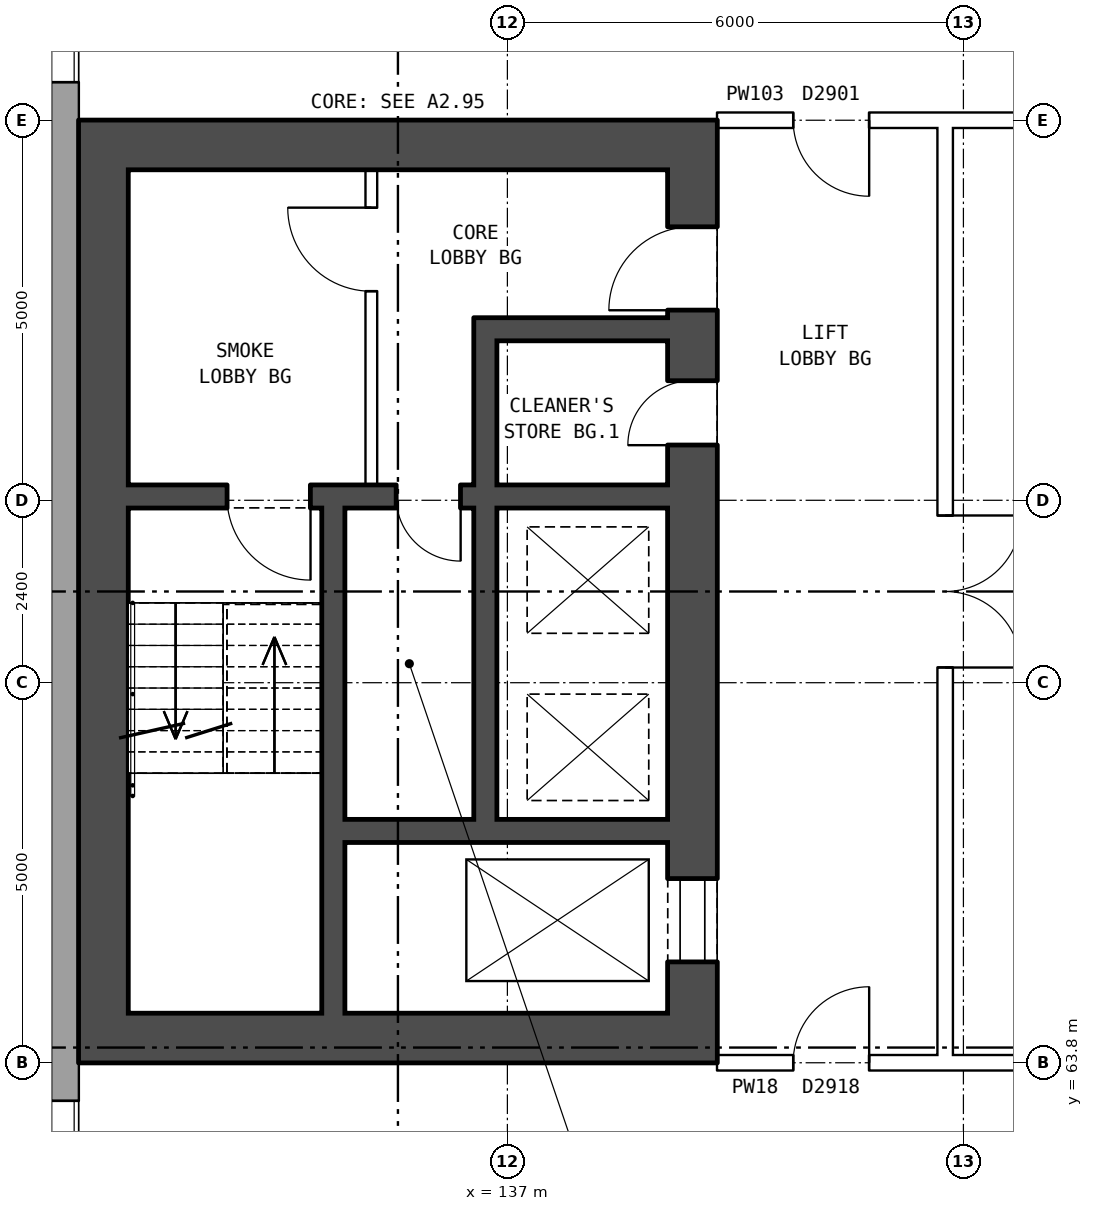
"""IFC4 building model, lengths in metres.
Left out: names, types, materials, properties, quantities, classifications, styles, units other than length and angle.
Written with IfcOpenShell. Run it as: python <this file> out.ifc"""

import sys

from ifc_helpers import new_model, si_unit, direction, frame, frame_2d, origin, place, context, subcontext, project, spatial, rectangle, extrude, element, fill, save


model = new_model("IFC4")
c1 = context("Model", 3, precision=1e-05, world=origin(), true_north=direction((0.0, 1.0)))
c2 = subcontext(c1, "Body", "Model", "MODEL_VIEW")
j1 = project(units=[si_unit("LENGTHUNIT", "METRE"), si_unit("PLANEANGLEUNIT", "RADIAN")], contexts=[c1])
p1 = place(None, origin())
s1 = spatial("IfcSite", under=j1, at=p1, CompositionType="ELEMENT")
p2 = place(p1, origin())
s2 = spatial("IfcBuilding", under=s1, at=p2, CompositionType="ELEMENT")
p3 = place(p2, frame((0.0, 0.0, 90.2)))
s3 = spatial("IfcBuildingStorey", under=s2, at=p3, CompositionType="ELEMENT", Elevation=90.2)
p4 = place(p3, frame((131.18, 82.925, 0.0), z_axis=(0.0, 0.0, 1.0), x_axis=(0.0, -1.0, 0.0)))
e1 = element("IfcWall", 1, at=p4, inside=s3, PredefinedType="STANDARD", context=c2, shape_type="SweptSolid", body=[
    extrude(rectangle(XDim=25.851, YDim=0.36, at=frame_2d((12.925, 0.0))), origin(), (0.0, 0.0, 1.0), 5.6),
])
p5 = place(p4, frame((1.625, 0.0, 0.15)))
e2 = element("IfcOpeningElement", 2, at=p5, cuts=e1, PredefinedType="OPENING", context=c2, shape_type="SweptSolid", body=[
    extrude(rectangle(XDim=1.6, YDim=2.4, at=frame_2d((0.8, 1.2))), frame((0.0, 0.19, 0.0), z_axis=(0.0, -1.0, 0.0), x_axis=(1.0, 0.0, 0.0)), (0.0, 0.0, 1.0), 0.38),
])
p6 = place(p4, frame((4.625, 0.0, 0.15)))
e3 = element("IfcOpeningElement", 3, at=p6, cuts=e1, PredefinedType="OPENING", context=c2, shape_type="SweptSolid", body=[
    extrude(rectangle(XDim=1.6, YDim=2.4, at=frame_2d((0.8, 1.2))), frame((0.0, 0.19, 0.0), z_axis=(0.0, -1.0, 0.0), x_axis=(1.0, 0.0, 0.0)), (0.0, 0.0, 1.0), 0.38),
])
p7 = place(p4, frame((19.625, 0.0, 0.15)))
e4 = element("IfcOpeningElement", 4, at=p7, cuts=e1, PredefinedType="OPENING", context=c2, shape_type="SweptSolid", body=[
    extrude(rectangle(XDim=1.6, YDim=2.4, at=frame_2d((0.8, 1.2))), frame((0.0, 0.19, 0.0), z_axis=(0.0, -1.0, 0.0), x_axis=(1.0, 0.0, 0.0)), (0.0, 0.0, 1.0), 0.38),
])
p8 = place(p4, frame((22.625, 0.0, 0.15)))
e5 = element("IfcOpeningElement", 5, at=p8, cuts=e1, PredefinedType="OPENING", context=c2, shape_type="SweptSolid", body=[
    extrude(rectangle(XDim=1.6, YDim=2.4, at=frame_2d((0.8, 1.2))), frame((0.0, 0.19, 0.0), z_axis=(0.0, -1.0, 0.0), x_axis=(1.0, 0.0, 0.0)), (0.0, 0.0, 1.0), 0.38),
])
p9 = place(p3, frame((139.435, 64.45, 0.0), z_axis=(0.0, 0.0, 1.0), x_axis=(0.0, 1.0, 0.0)))
e6 = element("IfcWall", 6, at=p9, inside=s3, PredefinedType="SHEAR", context=c2, shape_type="SweptSolid", body=[
    extrude(rectangle(XDim=11.1, YDim=0.65, at=frame_2d((5.55, 0.0))), origin(), (0.0, 0.0, 1.0), 5.6),
])
p10 = place(p9, frame((0.675, 0.0, 0.0)))
e7 = element("IfcOpeningElement", 7, at=p10, cuts=e6, PredefinedType="OPENING", context=c2, shape_type="SweptSolid", body=[
    extrude(rectangle(XDim=1.1, YDim=2.1, at=frame_2d((0.55, 1.05))), frame((0.0, 0.335, 0.0), z_axis=(0.0, -1.0, 0.0), x_axis=(1.0, 0.0, 0.0)), (0.0, 0.0, 1.0), 0.67),
])
p11 = place(p9, frame((9.25, 0.0, 0.0)))
e8 = element("IfcOpeningElement", 8, at=p11, cuts=e6, PredefinedType="OPENING", context=c2, shape_type="SweptSolid", body=[
    extrude(rectangle(XDim=1.1, YDim=2.1, at=frame_2d((0.55, 1.05))), frame((0.0, 0.335, 0.0), z_axis=(0.0, -1.0, 0.0), x_axis=(1.0, 0.0, 0.0)), (0.0, 0.0, 1.0), 0.67),
])
p12 = place(p9, frame((7.475, 0.0, 0.0)))
e9 = element("IfcOpeningElement", 9, at=p12, cuts=e6, PredefinedType="OPENING", context=c2, shape_type="SweptSolid", body=[
    extrude(rectangle(XDim=0.85, YDim=2.1, at=frame_2d((0.425, 1.05))), frame((0.0, 0.335, 0.0), z_axis=(0.0, -1.0, 0.0), x_axis=(1.0, 0.0, 0.0)), (0.0, 0.0, 1.0), 0.67),
])
p13 = place(p3, frame((131.685, 64.45, 0.0), z_axis=(0.0, 0.0, 1.0), x_axis=(0.0, 1.0, 0.0)))
e10 = element("IfcWall", 10, at=p13, inside=s3, PredefinedType="SHEAR", context=c2, shape_type="SweptSolid", body=[
    extrude(rectangle(XDim=11.1, YDim=0.65, at=frame_2d((5.55, 0.0))), origin(), (0.0, 0.0, 1.0), 5.6),
])
for number, where, z_axis, x_axis in (
    (11, (139.76, 64.125, 0.0), (0.0, 0.0, 1.0), (-1.0, 0.0, 0.0)),
    (12, (139.76, 75.875, 0.0), (0.0, 0.0, 1.0), (-1.0, 0.0, 0.0)),
):
    element("IfcWall", number, at=place(p3, frame(where, z_axis=z_axis, x_axis=x_axis)), inside=s3, PredefinedType="SHEAR", context=c2, shape_type="SweptSolid", body=[
        extrude(rectangle(XDim=8.4, YDim=0.65, at=frame_2d((4.2, 0.0))), origin(), (0.0, 0.0, 1.0), 5.6),
    ])
p14 = place(p3, frame((139.11, 66.85, 0.0), z_axis=(0.0, 0.0, 1.0), x_axis=(-1.0, 0.0, 0.0)))
e13 = element("IfcWall", 13, at=p14, inside=s3, PredefinedType="SHEAR", context=c2, shape_type="SweptSolid", body=[
    extrude(rectangle(XDim=4.25, YDim=0.3, at=frame_2d((2.125, 0.0))), origin(), (0.0, 0.0, 1.0), 5.6),
])
p15 = place(p3, frame((139.11, 71.25, 0.0), z_axis=(0.0, 0.0, 1.0), x_axis=(-1.0, 0.0, 0.0)))
e14 = element("IfcWall", 14, at=p15, inside=s3, PredefinedType="SHEAR", context=c2, shape_type="SweptSolid", body=[
    extrude(rectangle(XDim=7.1, YDim=0.3, at=frame_2d((3.55, 0.0))), origin(), (0.0, 0.0, 1.0), 5.6),
])
p16 = place(p15, frame((4.7, 0.0, 0.0)))
e15 = element("IfcOpeningElement", 15, at=p16, cuts=e14, PredefinedType="OPENING", context=c2, shape_type="SweptSolid", body=[
    extrude(rectangle(XDim=1.1, YDim=2.1, at=frame_2d((0.55, 1.05))), frame((0.0, 0.16, 0.0), z_axis=(0.0, -1.0, 0.0), x_axis=(1.0, 0.0, 0.0)), (0.0, 0.0, 1.0), 0.32),
])
p17 = place(p15, frame((2.725, 0.0, 0.0)))
e16 = element("IfcOpeningElement", 16, at=p17, cuts=e14, PredefinedType="OPENING", context=c2, shape_type="SweptSolid", body=[
    extrude(rectangle(XDim=0.85, YDim=2.1, at=frame_2d((0.425, 1.05))), frame((0.0, 0.16, 0.0), z_axis=(0.0, -1.0, 0.0), x_axis=(1.0, 0.0, 0.0)), (0.0, 0.0, 1.0), 0.32),
])
p18 = place(p3, frame((139.11, 73.45, 0.0), z_axis=(0.0, 0.0, 1.0), x_axis=(-1.0, 0.0, 0.0)))
e17 = element("IfcWall", 17, at=p18, inside=s3, PredefinedType="SHEAR", context=c2, shape_type="SweptSolid", body=[
    extrude(rectangle(XDim=2.25, YDim=0.3, at=frame_2d((1.125, 0.0))), origin(), (0.0, 0.0, 1.0), 5.6),
])
p19 = place(p3, frame((136.71, 67.0, 0.0), z_axis=(0.0, 0.0, 1.0), x_axis=(0.0, 1.0, 0.0)))
e18 = element("IfcWall", 18, at=p19, inside=s3, PredefinedType="SHEAR", context=c2, shape_type="SweptSolid", body=[
    extrude(rectangle(XDim=4.1, YDim=0.3, at=frame_2d((2.05, 0.0))), origin(), (0.0, 0.0, 1.0), 5.6),
])
p20 = place(p3, frame((136.71, 71.4, 0.0), z_axis=(0.0, 0.0, 1.0), x_axis=(0.0, 1.0, 0.0)))
e19 = element("IfcWall", 19, at=p20, inside=s3, PredefinedType="SHEAR", context=c2, shape_type="SweptSolid", body=[
    extrude(rectangle(XDim=2.2, YDim=0.3, at=frame_2d((1.1, 0.0))), origin(), (0.0, 0.0, 1.0), 5.6),
])
p21 = place(p3, frame((135.21, 71.4, 0.0), z_axis=(0.0, 0.0, 1.0), x_axis=(0.0, 1.0, 0.0)))
e20 = element("IfcWall", 20, at=p21, inside=s3, PredefinedType="PARTITIONING", context=c2, shape_type="SweptSolid", body=[
    extrude(rectangle(XDim=4.15, YDim=0.15, at=frame_2d((2.075, 0.0))), origin(), (0.0, 0.0, 1.0), 5.6),
])
p22 = place(p21, frame((2.55, 0.0, 0.0)))
e21 = element("IfcOpeningElement", 21, at=p22, cuts=e20, PredefinedType="OPENING", context=c2, shape_type="SweptSolid", body=[
    extrude(rectangle(XDim=1.1, YDim=2.1, at=frame_2d((0.55, 1.05))), frame((0.0, 0.085, 0.0), z_axis=(0.0, -1.0, 0.0), x_axis=(1.0, 0.0, 0.0)), (0.0, 0.0, 1.0), 0.17),
])
p23 = place(p3, frame((134.71, 64.45, 0.0), z_axis=(0.0, 0.0, 1.0), x_axis=(0.0, 1.0, 0.0)))
e22 = element("IfcWall", 22, at=p23, inside=s3, PredefinedType="SHEAR", context=c2, shape_type="SweptSolid", body=[
    extrude(rectangle(XDim=6.65, YDim=0.3, at=frame_2d((3.325, 0.0))), origin(), (0.0, 0.0, 1.0), 5.6),
])
p24 = place(p3, frame((142.76, 63.9, 0.0), z_axis=(0.0, 0.0, 1.0), x_axis=(0.0, 1.0, 0.0)))
e23 = element("IfcWall", 23, at=p24, inside=s3, PredefinedType="PARTITIONING", context=c2, shape_type="SweptSolid", body=[
    extrude(rectangle(XDim=12.2, YDim=0.2, at=frame_2d((6.1, 0.0))), origin(), (0.0, 0.0, 1.0), 5.6),
])
p25 = place(p24, frame((5.1, 0.0, 0.0)))
e24 = element("IfcOpeningElement", 24, at=p25, cuts=e23, PredefinedType="OPENING", context=c2, shape_type="SweptSolid", body=[
    extrude(rectangle(XDim=2.0, YDim=2.1, at=frame_2d((1.0, 1.05))), frame((0.0, 0.11, 0.0), z_axis=(0.0, -1.0, 0.0), x_axis=(1.0, 0.0, 0.0)), (0.0, 0.0, 1.0), 0.22),
])
p26 = place(p3, frame((142.76, 63.8, 0.0), z_axis=(0.0, 0.0, 1.0), x_axis=(1.0, 0.0, 0.0)))
e25 = element("IfcWall", 25, at=p26, inside=s3, PredefinedType="PARTITIONING", context=c2, shape_type="SweptSolid", body=[
    extrude(rectangle(XDim=14.48, YDim=0.2, at=frame_2d((7.24, 0.0))), origin(), (0.0, 0.0, 1.0), 5.6),
])
p27 = place(p26, frame((6.34, 0.0, 0.0)))
e26 = element("IfcOpeningElement", 26, at=p27, cuts=e25, PredefinedType="OPENING", context=c2, shape_type="SweptSolid", body=[
    extrude(rectangle(XDim=1.8, YDim=2.1, at=frame_2d((0.9, 1.05))), frame((0.0, 0.11, 0.0), z_axis=(0.0, -1.0, 0.0), x_axis=(1.0, 0.0, 0.0)), (0.0, 0.0, 1.0), 0.22),
])
p28 = place(p3, frame((139.76, 63.8, 0.0), z_axis=(0.0, 0.0, 1.0), x_axis=(1.0, 0.0, 0.0)))
e27 = element("IfcWall", 27, at=p28, inside=s3, PredefinedType="PARTITIONING", context=c2, shape_type="SweptSolid", body=[
    extrude(rectangle(XDim=3.0, YDim=0.2, at=frame_2d((1.5, 0.0))), origin(), (0.0, 0.0, 1.0), 5.6),
])
p29 = place(p28, frame((1.0, 0.0, 0.0)))
e28 = element("IfcOpeningElement", 28, at=p29, cuts=e27, PredefinedType="OPENING", context=c2, shape_type="SweptSolid", body=[
    extrude(rectangle(XDim=1.0, YDim=2.1, at=frame_2d((0.5, 1.05))), frame((0.0, 0.11, 0.0), z_axis=(0.0, -1.0, 0.0), x_axis=(1.0, 0.0, 0.0)), (0.0, 0.0, 1.0), 0.22),
])
p30 = place(p3, frame((142.76, 76.2, 0.0), z_axis=(0.0, 0.0, 1.0), x_axis=(1.0, 0.0, 0.0)))
e29 = element("IfcWall", 29, at=p30, inside=s3, PredefinedType="PARTITIONING", context=c2, shape_type="SweptSolid", body=[
    extrude(rectangle(XDim=14.48, YDim=0.2, at=frame_2d((7.24, 0.0))), origin(), (0.0, 0.0, 1.0), 5.6),
])
p31 = place(p30, frame((6.34, 0.0, 0.0)))
e30 = element("IfcOpeningElement", 30, at=p31, cuts=e29, PredefinedType="OPENING", context=c2, shape_type="SweptSolid", body=[
    extrude(rectangle(XDim=1.8, YDim=2.1, at=frame_2d((0.9, 1.05))), frame((0.0, 0.11, 0.0), z_axis=(0.0, -1.0, 0.0), x_axis=(1.0, 0.0, 0.0)), (0.0, 0.0, 1.0), 0.22),
])
p32 = place(p3, frame((139.76, 76.2, 0.0), z_axis=(0.0, 0.0, 1.0), x_axis=(1.0, 0.0, 0.0)))
e31 = element("IfcWall", 31, at=p32, inside=s3, PredefinedType="PARTITIONING", context=c2, shape_type="SweptSolid", body=[
    extrude(rectangle(XDim=3.0, YDim=0.2, at=frame_2d((1.5, 0.0))), origin(), (0.0, 0.0, 1.0), 5.6),
])
p33 = place(p32, frame((1.0, 0.0, 0.0)))
e32 = element("IfcOpeningElement", 32, at=p33, cuts=e31, PredefinedType="OPENING", context=c2, shape_type="SweptSolid", body=[
    extrude(rectangle(XDim=1.0, YDim=2.1, at=frame_2d((0.5, 1.05))), frame((0.0, 0.11, 0.0), z_axis=(0.0, -1.0, 0.0), x_axis=(1.0, 0.0, 0.0)), (0.0, 0.0, 1.0), 0.22),
])
p34 = place(p6, origin())
e33 = element("IfcWindow", 33, at=p34, inside=s3, PartitioningType="SINGLE_PANEL", PredefinedType="WINDOW", context=c2, shape_type="SweptSolid", body=[
    extrude(rectangle(XDim=1.6, YDim=2.4, at=frame_2d((0.8, 1.2))), frame((0.0, 0.15, 0.0), z_axis=(0.0, -1.0, 0.0), x_axis=(1.0, 0.0, 0.0)), (0.0, 0.0, 1.0), 0.06),
])
fill(e3, e33)
p35 = place(p7, origin())
e34 = element("IfcWindow", 34, at=p35, inside=s3, PartitioningType="SINGLE_PANEL", PredefinedType="WINDOW", context=c2, shape_type="SweptSolid", body=[
    extrude(rectangle(XDim=1.6, YDim=2.4, at=frame_2d((0.8, 1.2))), frame((0.0, 0.15, 0.0), z_axis=(0.0, -1.0, 0.0), x_axis=(1.0, 0.0, 0.0)), (0.0, 0.0, 1.0), 0.06),
])
fill(e4, e34)
p36 = place(p10, origin())
e35 = element("IfcDoor", 35, at=p36, inside=s3, OperationType="DOUBLE_DOOR_SLIDING", PredefinedType="DOOR", context=c2, shape_type="SweptSolid", body=[
    extrude(rectangle(XDim=1.1, YDim=2.1, at=frame_2d((0.55, 1.05))), frame((0.0, 0.31, 0.0), z_axis=(0.0, -1.0, 0.0), x_axis=(1.0, 0.0, 0.0)), (0.0, 0.0, 1.0), 0.05),
])
fill(e7, e35)
p37 = place(p11, origin())
e36 = element("IfcDoor", 36, at=p37, inside=s3, OperationType="SINGLE_SWING_LEFT", PredefinedType="DOOR", context=c2, shape_type="SweptSolid", body=[
    extrude(rectangle(XDim=1.1, YDim=2.1, at=frame_2d((0.55, 1.05))), frame((0.0, 0.31, 0.0), z_axis=(0.0, -1.0, 0.0), x_axis=(1.0, 0.0, 0.0)), (0.0, 0.0, 1.0), 0.05),
])
fill(e8, e36)
p38 = place(p22, origin())
e37 = element("IfcDoor", 37, at=p38, inside=s3, OperationType="SINGLE_SWING_RIGHT", PredefinedType="DOOR", context=c2, shape_type="SweptSolid", body=[
    extrude(rectangle(XDim=1.1, YDim=2.1, at=frame_2d((0.55, 1.05))), frame((0.0, 0.025, 0.0), z_axis=(0.0, -1.0, 0.0), x_axis=(1.0, 0.0, 0.0)), (0.0, 0.0, 1.0), 0.05),
])
fill(e21, e37)
p39 = place(p16, origin())
e38 = element("IfcDoor", 38, at=p39, inside=s3, OperationType="SINGLE_SWING_LEFT", PredefinedType="DOOR", context=c2, shape_type="SweptSolid", body=[
    extrude(rectangle(XDim=1.1, YDim=2.1, at=frame_2d((0.55, 1.05))), frame((0.0, 0.025, 0.0), z_axis=(0.0, -1.0, 0.0), x_axis=(1.0, 0.0, 0.0)), (0.0, 0.0, 1.0), 0.05),
])
fill(e15, e38)
p40 = place(p12, origin())
e39 = element("IfcDoor", 39, at=p40, inside=s3, OperationType="SINGLE_SWING_LEFT", PredefinedType="DOOR", context=c2, shape_type="SweptSolid", body=[
    extrude(rectangle(XDim=0.85, YDim=2.1, at=frame_2d((0.425, 1.05))), frame((0.0, 0.31, 0.0), z_axis=(0.0, -1.0, 0.0), x_axis=(1.0, 0.0, 0.0)), (0.0, 0.0, 1.0), 0.05),
])
fill(e9, e39)
p41 = place(p17, origin())
e40 = element("IfcDoor", 40, at=p41, inside=s3, OperationType="SINGLE_SWING_LEFT", PredefinedType="DOOR", context=c2, shape_type="SweptSolid", body=[
    extrude(rectangle(XDim=0.85, YDim=2.1, at=frame_2d((0.425, 1.05))), frame((0.0, 0.025, 0.0), z_axis=(0.0, -1.0, 0.0), x_axis=(1.0, 0.0, 0.0)), (0.0, 0.0, 1.0), 0.05),
])
fill(e16, e40)
p42 = place(p25, frame((2.0, 0.0, 0.0), z_axis=(0.0, 0.0, 1.0), x_axis=(-1.0, 0.0, 0.0)))
e41 = element("IfcDoor", 41, at=p42, inside=s3, OperationType="DOUBLE_DOOR_SINGLE_SWING", PredefinedType="DOOR", context=c2, shape_type="SweptSolid", body=[
    extrude(rectangle(XDim=2.0, YDim=2.1, at=frame_2d((1.0, 1.05))), frame((0.0, 0.025, 0.0), z_axis=(0.0, -1.0, 0.0), x_axis=(1.0, 0.0, 0.0)), (0.0, 0.0, 1.0), 0.05),
])
fill(e24, e41)
p43 = place(p29, origin())
e42 = element("IfcDoor", 42, at=p43, inside=s3, OperationType="SINGLE_SWING_RIGHT", PredefinedType="DOOR", context=c2, shape_type="SweptSolid", body=[
    extrude(rectangle(XDim=1.0, YDim=2.1, at=frame_2d((0.5, 1.05))), frame((0.0, 0.025, 0.0), z_axis=(0.0, -1.0, 0.0), x_axis=(1.0, 0.0, 0.0)), (0.0, 0.0, 1.0), 0.05),
])
fill(e28, e42)
p44 = place(p33, frame((1.0, 0.0, 0.0), z_axis=(0.0, 0.0, 1.0), x_axis=(-1.0, 0.0, 0.0)))
e43 = element("IfcDoor", 43, at=p44, inside=s3, OperationType="SINGLE_SWING_LEFT", PredefinedType="DOOR", context=c2, shape_type="SweptSolid", body=[
    extrude(rectangle(XDim=1.0, YDim=2.1, at=frame_2d((0.5, 1.05))), frame((0.0, 0.025, 0.0), z_axis=(0.0, -1.0, 0.0), x_axis=(1.0, 0.0, 0.0)), (0.0, 0.0, 1.0), 0.05),
])
fill(e32, e43)
save(model, sys.argv[1])
